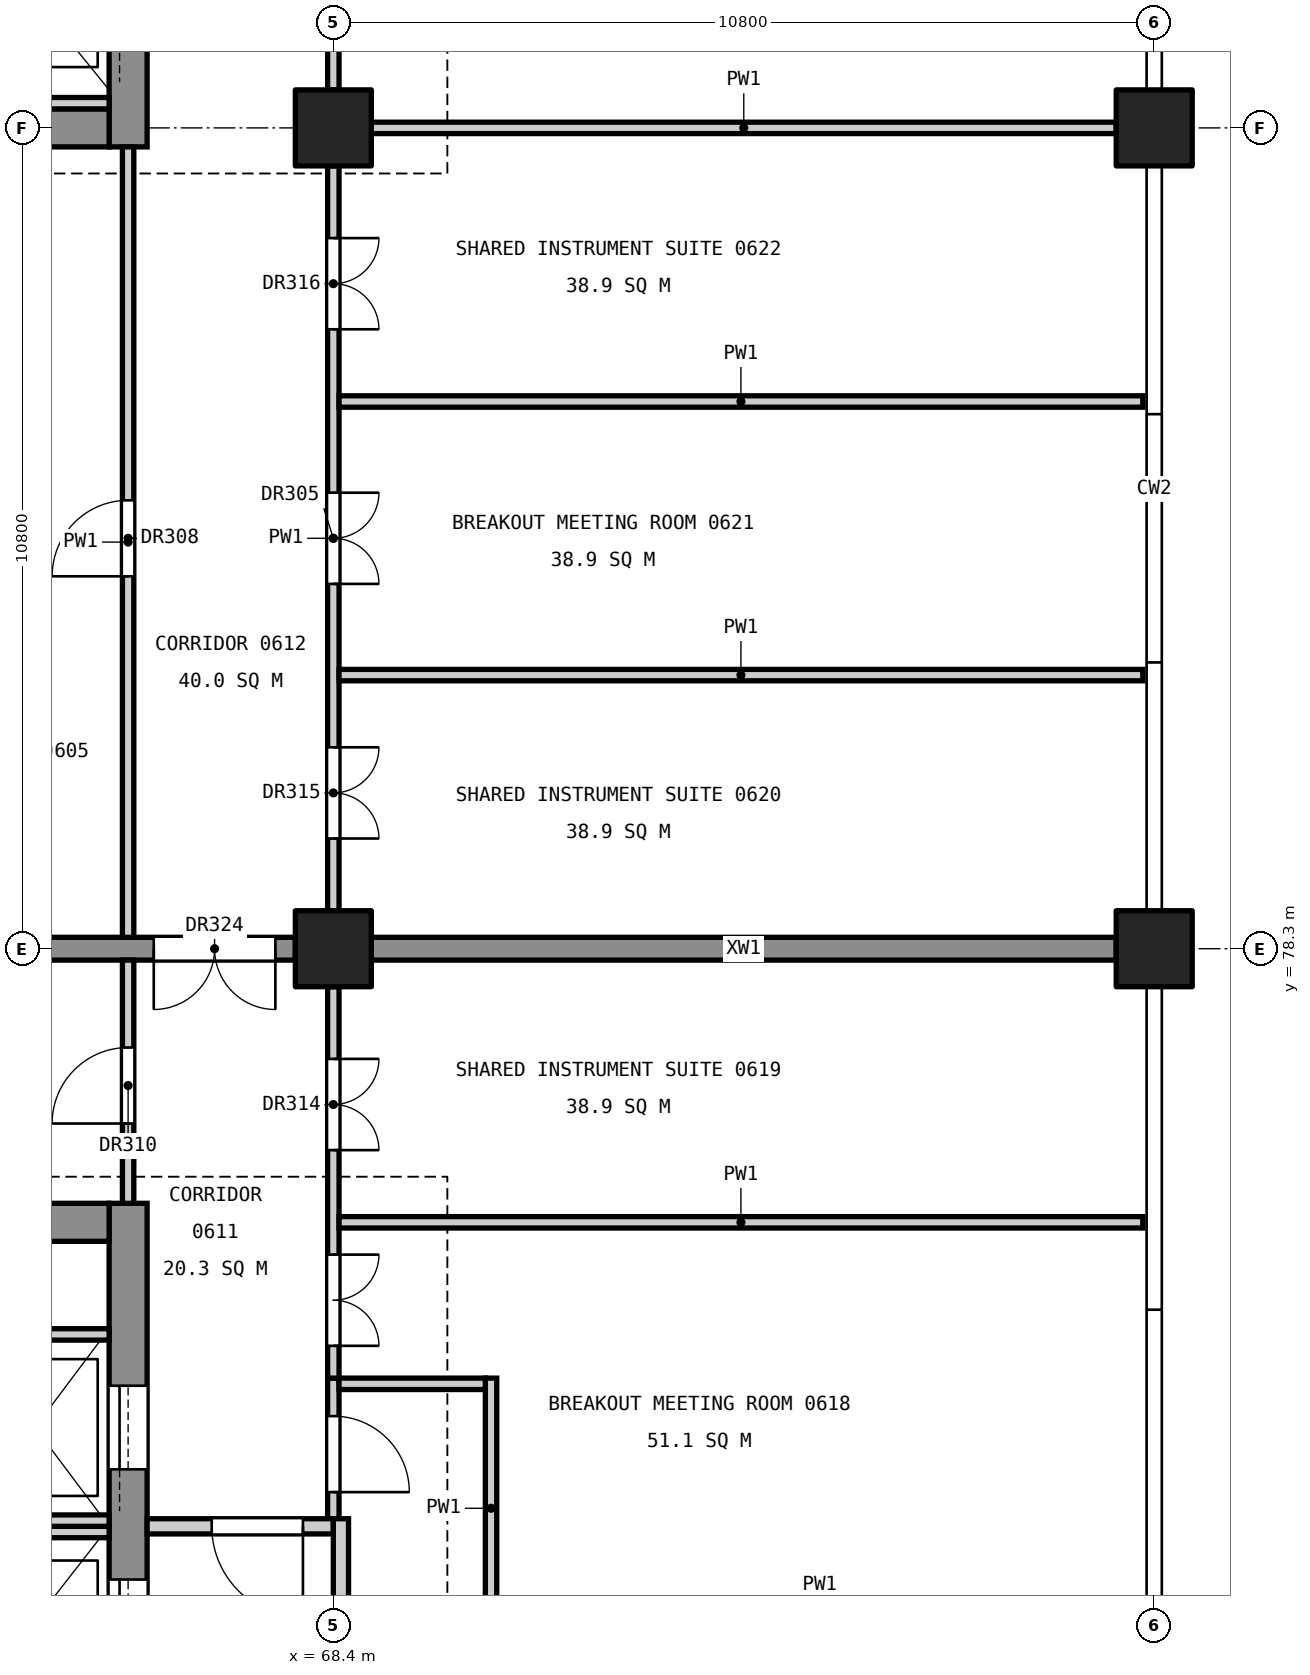
"""IFC4 building model, lengths in metres.
Left out: names, types, materials, properties, quantities, classifications, styles, units other than length and angle.
Written with IfcOpenShell. Run it as: python <this file> out.ifc"""

import sys

from ifc_helpers import new_model, si_unit, direction, frame, frame_2d, origin, origin_2d, place, context, subcontext, project, spatial, rectangle, extrude, element, fill, save


model = new_model("IFC4")
c1 = context("Model", 3, precision=1e-05, world=origin(), true_north=direction((0.0, 1.0)))
c2 = subcontext(c1, "Body", "Model", "MODEL_VIEW")
j1 = project(units=[si_unit("LENGTHUNIT", "METRE"), si_unit("PLANEANGLEUNIT", "RADIAN")], contexts=[c1])
p1 = place(None, origin())
s1 = spatial("IfcSite", under=j1, at=p1, CompositionType="ELEMENT")
p2 = place(p1, origin())
s2 = spatial("IfcBuilding", under=s1, at=p2, CompositionType="ELEMENT")
p3 = place(p2, frame((0.0, 0.0, 31.8)))
s3 = spatial("IfcBuildingStorey", under=s2, at=p3, CompositionType="ELEMENT", Elevation=31.8)
for number, where, z_axis, x_axis in (
    (1, (68.4, 78.3, 0.0), (0.0, 0.0, 1.0), (1.0, 0.0, 0.0)),
    (2, (68.4, 89.1, 0.0), (0.0, 0.0, 1.0), (1.0, 0.0, 0.0)),
    (3, (79.2, 78.3, 0.0), (0.0, 0.0, 1.0), (1.0, 0.0, 0.0)),
    (4, (79.2, 89.1, 0.0), (0.0, 0.0, 1.0), (1.0, 0.0, 0.0)),
):
    element("IfcColumn", number, at=place(p3, frame(where, z_axis=z_axis, x_axis=x_axis)), inside=s3, PredefinedType="COLUMN", context=c2, shape_type="SweptSolid", body=[
        extrude(rectangle(XDim=1.0, YDim=1.0, at=origin_2d()), origin(), (0.0, 0.0, 1.0), 4.8),
    ])
p4 = place(p3, frame((65.7, 60.05, 0.0), z_axis=(0.0, 0.0, 1.0), x_axis=(0.0, 1.0, 0.0)))
e5 = element("IfcWall", 5, at=p4, inside=s3, PredefinedType="SHEAR", context=c2, shape_type="SweptSolid", body=[
    extrude(rectangle(XDim=14.9, YDim=0.5, at=frame_2d((7.45, 0.0))), origin(), (0.0, 0.0, 1.0), 4.55),
])
p5 = place(p4, frame((0.55, 0.0, 0.0)))
e6 = element("IfcOpeningElement", 6, at=p5, cuts=e5, PredefinedType="OPENING", context=c2, shape_type="SweptSolid", body=[
    extrude(rectangle(XDim=1.4, YDim=2.1, at=frame_2d((0.7, 1.05))), frame((0.0, 0.26, 0.0), z_axis=(0.0, -1.0, 0.0), x_axis=(1.0, 0.0, 0.0)), (0.0, 0.0, 1.0), 0.52),
])
p6 = place(p4, frame((8.85, 0.0, 0.0)))
e7 = element("IfcOpeningElement", 7, at=p6, cuts=e5, PredefinedType="OPENING", context=c2, shape_type="SweptSolid", body=[
    extrude(rectangle(XDim=1.1, YDim=2.1, at=frame_2d((0.55, 1.05))), frame((0.0, 0.26, 0.0), z_axis=(0.0, -1.0, 0.0), x_axis=(1.0, 0.0, 0.0)), (0.0, 0.0, 1.0), 0.52),
])
p7 = place(p4, frame((11.4, 0.0, 0.0)))
e8 = element("IfcOpeningElement", 8, at=p7, cuts=e5, PredefinedType="OPENING", context=c2, shape_type="SweptSolid", body=[
    extrude(rectangle(XDim=1.1, YDim=2.1, at=frame_2d((0.55, 1.05))), frame((0.0, 0.26, 0.0), z_axis=(0.0, -1.0, 0.0), x_axis=(1.0, 0.0, 0.0)), (0.0, 0.0, 1.0), 0.52),
])
p8 = place(p3, frame((61.45, 74.7, 0.0), z_axis=(0.0, 0.0, 1.0), x_axis=(1.0, 0.0, 0.0)))
e9 = element("IfcWall", 9, at=p8, inside=s3, PredefinedType="SHEAR", context=c2, shape_type="SweptSolid", body=[
    extrude(rectangle(XDim=4.0, YDim=0.5, at=frame_2d((2.0, 0.0))), origin(), (0.0, 0.0, 1.0), 4.55),
])
p9 = place(p3, frame((65.7, 88.85, 0.0), z_axis=(0.0, 0.0, 1.0), x_axis=(0.0, 1.0, 0.0)))
e10 = element("IfcWall", 10, at=p9, inside=s3, PredefinedType="SHEAR", context=c2, shape_type="SweptSolid", body=[
    extrude(rectangle(XDim=11.3, YDim=0.5, at=frame_2d((5.65, 0.0))), origin(), (0.0, 0.0, 1.0), 4.55),
])
p10 = place(p9, frame((9.35, 0.0, 0.0)))
e11 = element("IfcOpeningElement", 11, at=p10, cuts=e10, PredefinedType="OPENING", context=c2, shape_type="SweptSolid", body=[
    extrude(rectangle(XDim=1.4, YDim=2.1, at=frame_2d((0.7, 1.05))), frame((0.0, 0.26, 0.0), z_axis=(0.0, -1.0, 0.0), x_axis=(1.0, 0.0, 0.0)), (0.0, 0.0, 1.0), 0.52),
])
p11 = place(p9, frame((1.4, 0.0, 0.0)))
e12 = element("IfcOpeningElement", 12, at=p11, cuts=e10, PredefinedType="OPENING", context=c2, shape_type="SweptSolid", body=[
    extrude(rectangle(XDim=1.1, YDim=2.1, at=frame_2d((0.55, 1.05))), frame((0.0, 0.26, 0.0), z_axis=(0.0, -1.0, 0.0), x_axis=(1.0, 0.0, 0.0)), (0.0, 0.0, 1.0), 0.52),
])
p12 = place(p3, frame((61.45, 89.1, 0.0), z_axis=(0.0, 0.0, 1.0), x_axis=(1.0, 0.0, 0.0)))
e13 = element("IfcWall", 13, at=p12, inside=s3, PredefinedType="SHEAR", context=c2, shape_type="SweptSolid", body=[
    extrude(rectangle(XDim=4.0, YDim=0.5, at=frame_2d((2.0, 0.0))), origin(), (0.0, 0.0, 1.0), 4.55),
])
p13 = place(p3, frame((61.7, 78.3, 0.0), z_axis=(0.0, 0.0, 1.0), x_axis=(1.0, 0.0, 0.0)))
e14 = element("IfcWall", 14, at=p13, inside=s3, PredefinedType="SHEAR", context=c2, shape_type="SweptSolid", body=[
    extrude(rectangle(XDim=6.2, YDim=0.3, at=frame_2d((3.1, 0.0))), origin(), (0.0, 0.0, 1.0), 4.55),
])
p14 = place(p13, frame((4.337, 0.0, 0.0)))
e15 = element("IfcOpeningElement", 15, at=p14, cuts=e14, PredefinedType="OPENING", context=c2, shape_type="SweptSolid", body=[
    extrude(rectangle(XDim=1.6, YDim=2.1, at=frame_2d((0.8, 1.05))), frame((0.0, 0.16, 0.0), z_axis=(0.0, -1.0, 0.0), x_axis=(1.0, 0.0, 0.0)), (0.0, 0.0, 1.0), 0.32),
])
p15 = place(p3, frame((68.9, 78.3, 0.0), z_axis=(0.0, 0.0, 1.0), x_axis=(1.0, 0.0, 0.0)))
e16 = element("IfcWall", 16, at=p15, inside=s3, PredefinedType="SHEAR", context=c2, shape_type="SweptSolid", body=[
    extrude(rectangle(XDim=9.8, YDim=0.3, at=frame_2d((4.9, 0.0))), origin(), (0.0, 0.0, 1.0), 4.55),
])
for number, where, z_axis, x_axis in (
    (17, (63.65, 70.625, 0.0), (0.0, 0.0, 1.0), (1.0, 0.0, 0.0)),
    (18, (63.65, 70.775, 0.0), (0.0, 0.0, 1.0), (1.0, 0.0, 0.0)),
    (19, (63.65, 73.225, 0.0), (0.0, 0.0, 1.0), (1.0, 0.0, 0.0)),
    (20, (63.65, 89.425, 0.0), (0.0, 0.0, 1.0), (1.0, 0.0, 0.0)),
):
    element("IfcWall", number, at=place(p3, frame(where, z_axis=z_axis, x_axis=x_axis)), inside=s3, PredefinedType="SOLIDWALL", context=c2, shape_type="SweptSolid", body=[
        extrude(rectangle(XDim=1.8, YDim=0.15, at=frame_2d((0.9, 0.0))), origin(), (0.0, 0.0, 1.0), 4.8),
    ])
p16 = place(p3, frame((65.7, 74.95, 0.0), z_axis=(0.0, 0.0, 1.0), x_axis=(0.0, 1.0, 0.0)))
e21 = element("IfcWall", 21, at=p16, inside=s3, PredefinedType="PARTITIONING", context=c2, shape_type="SweptSolid", body=[
    extrude(rectangle(XDim=3.2, YDim=0.15, at=frame_2d((1.6, 0.0))), origin(), (0.0, 0.0, 1.0), 3.55),
])
p17 = place(p16, frame((1.05, 0.0, 0.0)))
e22 = element("IfcOpeningElement", 22, at=p17, cuts=e21, PredefinedType="OPENING", context=c2, shape_type="SweptSolid", body=[
    extrude(rectangle(XDim=1.0, YDim=2.1, at=frame_2d((0.5, 1.05))), frame((0.0, 0.085, 0.0), z_axis=(0.0, -1.0, 0.0), x_axis=(1.0, 0.0, 0.0)), (0.0, 0.0, 1.0), 0.17),
])
p18 = place(p3, frame((65.7, 78.45, 0.0), z_axis=(0.0, 0.0, 1.0), x_axis=(0.0, 1.0, 0.0)))
e23 = element("IfcWall", 23, at=p18, inside=s3, PredefinedType="PARTITIONING", context=c2, shape_type="SweptSolid", body=[
    extrude(rectangle(XDim=10.4, YDim=0.15, at=frame_2d((5.2, 0.0))), origin(), (0.0, 0.0, 1.0), 3.55),
])
p19 = place(p18, frame((4.75, 0.0, 0.0)))
e24 = element("IfcOpeningElement", 24, at=p19, cuts=e23, PredefinedType="OPENING", context=c2, shape_type="SweptSolid", body=[
    extrude(rectangle(XDim=1.0, YDim=2.1, at=frame_2d((0.5, 1.05))), frame((0.0, 0.085, 0.0), z_axis=(0.0, -1.0, 0.0), x_axis=(1.0, 0.0, 0.0)), (0.0, 0.0, 1.0), 0.17),
])
p20 = place(p3, frame((68.4, 70.8, 0.0), z_axis=(0.0, 0.0, 1.0), x_axis=(0.0, 1.0, 0.0)))
e25 = element("IfcWall", 25, at=p20, inside=s3, PredefinedType="PARTITIONING", context=c2, shape_type="SweptSolid", body=[
    extrude(rectangle(XDim=1.85, YDim=0.15, at=frame_2d((0.925, 0.0))), origin(), (0.0, 0.0, 1.0), 3.55),
])
p21 = place(p20, frame((0.35, 0.0, 0.0)))
e26 = element("IfcOpeningElement", 26, at=p21, cuts=e25, PredefinedType="OPENING", context=c2, shape_type="SweptSolid", body=[
    extrude(rectangle(XDim=1.0, YDim=2.1, at=frame_2d((0.5, 1.05))), frame((0.0, 0.085, 0.0), z_axis=(0.0, -1.0, 0.0), x_axis=(1.0, 0.0, 0.0)), (0.0, 0.0, 1.0), 0.17),
])
p22 = place(p3, frame((68.4, 78.8, 0.0), z_axis=(0.0, 0.0, 1.0), x_axis=(0.0, 1.0, 0.0)))
e27 = element("IfcWall", 27, at=p22, inside=s3, PredefinedType="PARTITIONING", context=c2, shape_type="SweptSolid", body=[
    extrude(rectangle(XDim=9.8, YDim=0.15, at=frame_2d((4.9, 0.0))), origin(), (0.0, 0.0, 1.0), 3.55),
])
p23 = place(p22, frame((4.3, 0.0, 0.0)))
e28 = element("IfcOpeningElement", 28, at=p23, cuts=e27, PredefinedType="OPENING", context=c2, shape_type="SweptSolid", body=[
    extrude(rectangle(XDim=1.2, YDim=2.1, at=frame_2d((0.6, 1.05))), frame((0.0, 0.085, 0.0), z_axis=(0.0, -1.0, 0.0), x_axis=(1.0, 0.0, 0.0)), (0.0, 0.0, 1.0), 0.17),
])
p24 = place(p22, frame((0.95, 0.0, 0.0)))
e29 = element("IfcOpeningElement", 29, at=p24, cuts=e27, PredefinedType="OPENING", context=c2, shape_type="SweptSolid", body=[
    extrude(rectangle(XDim=1.2, YDim=2.1, at=frame_2d((0.6, 1.05))), frame((0.0, 0.085, 0.0), z_axis=(0.0, -1.0, 0.0), x_axis=(1.0, 0.0, 0.0)), (0.0, 0.0, 1.0), 0.17),
])
p25 = place(p22, frame((7.65, 0.0, 0.0)))
e30 = element("IfcOpeningElement", 30, at=p25, cuts=e27, PredefinedType="OPENING", context=c2, shape_type="SweptSolid", body=[
    extrude(rectangle(XDim=1.2, YDim=2.1, at=frame_2d((0.6, 1.05))), frame((0.0, 0.085, 0.0), z_axis=(0.0, -1.0, 0.0), x_axis=(1.0, 0.0, 0.0)), (0.0, 0.0, 1.0), 0.17),
])
p26 = place(p3, frame((68.4, 89.6, 0.0), z_axis=(0.0, 0.0, 1.0), x_axis=(0.0, 1.0, 0.0)))
e31 = element("IfcWall", 31, at=p26, inside=s3, PredefinedType="PARTITIONING", context=c2, shape_type="SweptSolid", body=[
    extrude(rectangle(XDim=3.5, YDim=0.15, at=frame_2d((1.75, 0.0))), origin(), (0.0, 0.0, 1.0), 3.55),
])
p27 = place(p26, frame((1.15, 0.0, 0.0)))
e32 = element("IfcOpeningElement", 32, at=p27, cuts=e31, PredefinedType="OPENING", context=c2, shape_type="SweptSolid", body=[
    extrude(rectangle(XDim=1.2, YDim=2.1, at=frame_2d((0.6, 1.05))), frame((0.0, 0.085, 0.0), z_axis=(0.0, -1.0, 0.0), x_axis=(1.0, 0.0, 0.0)), (0.0, 0.0, 1.0), 0.17),
])
p28 = place(p3, frame((65.95, 70.7, 0.0), z_axis=(0.0, 0.0, 1.0), x_axis=(1.0, 0.0, 0.0)))
e33 = element("IfcWall", 33, at=p28, inside=s3, PredefinedType="PARTITIONING", context=c2, shape_type="SweptSolid", body=[
    extrude(rectangle(XDim=2.45, YDim=0.2, at=frame_2d((1.225, 0.0))), origin(), (0.0, 0.0, 1.0), 3.55),
])
p29 = place(p28, frame((0.85, 0.0, 0.0)))
e34 = element("IfcOpeningElement", 34, at=p29, cuts=e33, PredefinedType="OPENING", context=c2, shape_type="SweptSolid", body=[
    extrude(rectangle(XDim=1.2, YDim=2.1, at=frame_2d((0.6, 1.05))), frame((0.0, 0.11, 0.0), z_axis=(0.0, -1.0, 0.0), x_axis=(1.0, 0.0, 0.0)), (0.0, 0.0, 1.0), 0.22),
])
p30 = place(p3, frame((68.5, 68.0, 0.0), z_axis=(0.0, 0.0, 1.0), x_axis=(0.0, 1.0, 0.0)))
e35 = element("IfcWall", 35, at=p30, inside=s3, PredefinedType="PARTITIONING", context=c2, shape_type="SweptSolid", body=[
    extrude(rectangle(XDim=2.8, YDim=0.2, at=frame_2d((1.4, 0.0))), origin(), (0.0, 0.0, 1.0), 3.55),
])
p31 = place(p3, frame((68.4, 72.65, 0.0), z_axis=(0.0, 0.0, 1.0), x_axis=(0.0, 1.0, 0.0)))
e36 = element("IfcWall", 36, at=p31, inside=s3, PredefinedType="PARTITIONING", context=c2, shape_type="SweptSolid", body=[
    extrude(rectangle(XDim=5.15, YDim=0.15, at=frame_2d((2.575, 0.0))), origin(), (0.0, 0.0, 1.0), 3.55),
])
p32 = place(p31, frame((0.425, 0.0, 0.0)))
e37 = element("IfcOpeningElement", 37, at=p32, cuts=e36, PredefinedType="OPENING", context=c2, shape_type="SweptSolid", body=[
    extrude(rectangle(XDim=1.2, YDim=2.1, at=frame_2d((0.6, 1.05))), frame((0.0, 0.085, 0.0), z_axis=(0.0, -1.0, 0.0), x_axis=(1.0, 0.0, 0.0)), (0.0, 0.0, 1.0), 0.17),
])
p33 = place(p31, frame((3.0, 0.0, 0.0)))
e38 = element("IfcOpeningElement", 38, at=p33, cuts=e36, PredefinedType="OPENING", context=c2, shape_type="SweptSolid", body=[
    extrude(rectangle(XDim=1.2, YDim=2.1, at=frame_2d((0.6, 1.05))), frame((0.0, 0.085, 0.0), z_axis=(0.0, -1.0, 0.0), x_axis=(1.0, 0.0, 0.0)), (0.0, 0.0, 1.0), 0.17),
])
p34 = place(p3, frame((70.475, 69.225, 0.0), z_axis=(0.0, 0.0, 1.0), x_axis=(0.0, 1.0, 0.0)))
e39 = element("IfcWall", 39, at=p34, inside=s3, PredefinedType="PARTITIONING", context=c2, shape_type="SweptSolid", body=[
    extrude(rectangle(XDim=3.425, YDim=0.15, at=frame_2d((1.712, 0.0))), origin(), (0.0, 0.0, 1.0), 3.55),
])
p35 = place(p3, frame((68.475, 72.575, 0.0), z_axis=(0.0, 0.0, 1.0), x_axis=(1.0, 0.0, 0.0)))
e40 = element("IfcWall", 40, at=p35, inside=s3, PredefinedType="PARTITIONING", context=c2, shape_type="SweptSolid", body=[
    extrude(rectangle(XDim=1.925, YDim=0.15, at=frame_2d((0.962, 0.0))), origin(), (0.0, 0.0, 1.0), 3.55),
])
for number, where, z_axis, x_axis in (
    (41, (68.475, 74.7, 0.0), (0.0, 0.0, 1.0), (1.0, 0.0, 0.0)),
    (42, (68.475, 81.9, 0.0), (0.0, 0.0, 1.0), (1.0, 0.0, 0.0)),
    (43, (68.475, 85.5, 0.0), (0.0, 0.0, 1.0), (1.0, 0.0, 0.0)),
):
    element("IfcWall", number, at=place(p3, frame(where, z_axis=z_axis, x_axis=x_axis)), inside=s3, PredefinedType="PARTITIONING", context=c2, shape_type="SweptSolid", body=[
        extrude(rectangle(XDim=10.575, YDim=0.15, at=frame_2d((5.288, 0.0))), origin(), (0.0, 0.0, 1.0), 3.85),
    ])
p36 = place(p3, frame((68.9, 89.1, 0.0), z_axis=(0.0, 0.0, 1.0), x_axis=(1.0, 0.0, 0.0)))
e44 = element("IfcWall", 44, at=p36, inside=s3, PredefinedType="PARTITIONING", context=c2, shape_type="SweptSolid", body=[
    extrude(rectangle(XDim=9.8, YDim=0.15, at=frame_2d((4.9, 0.0))), origin(), (0.0, 0.0, 1.0), 3.85),
])
p37 = place(p6, origin())
e45 = element("IfcDoor", 45, at=p37, inside=s3, OperationType="SLIDING_TO_LEFT", PredefinedType="DOOR", context=c2, shape_type="SweptSolid", body=[
    extrude(rectangle(XDim=1.1, YDim=2.1, at=frame_2d((0.55, 1.05))), frame((0.0, 0.025, 0.0), z_axis=(0.0, -1.0, 0.0), x_axis=(1.0, 0.0, 0.0)), (0.0, 0.0, 1.0), 0.05),
])
fill(e7, e45)
p38 = place(p7, origin())
e46 = element("IfcDoor", 46, at=p38, inside=s3, OperationType="SLIDING_TO_LEFT", PredefinedType="DOOR", context=c2, shape_type="SweptSolid", body=[
    extrude(rectangle(XDim=1.1, YDim=2.1, at=frame_2d((0.55, 1.05))), frame((0.0, 0.025, 0.0), z_axis=(0.0, -1.0, 0.0), x_axis=(1.0, 0.0, 0.0)), (0.0, 0.0, 1.0), 0.05),
])
fill(e8, e46)
p39 = place(p32, frame((1.2, 0.0, 0.0), z_axis=(0.0, 0.0, 1.0), x_axis=(-1.0, 0.0, 0.0)))
e47 = element("IfcDoor", 47, at=p39, inside=s3, OperationType="DOUBLE_DOOR_SINGLE_SWING", PredefinedType="DOOR", context=c2, shape_type="SweptSolid", body=[
    extrude(rectangle(XDim=1.2, YDim=2.1, at=frame_2d((0.6, 1.05))), frame((0.0, 0.025, 0.0), z_axis=(0.0, -1.0, 0.0), x_axis=(1.0, 0.0, 0.0)), (0.0, 0.0, 1.0), 0.05),
])
fill(e37, e47)
p40 = place(p23, frame((1.2, 0.0, 0.0), z_axis=(0.0, 0.0, 1.0), x_axis=(-1.0, 0.0, 0.0)))
e48 = element("IfcDoor", 48, at=p40, inside=s3, OperationType="DOUBLE_DOOR_SINGLE_SWING", PredefinedType="DOOR", context=c2, shape_type="SweptSolid", body=[
    extrude(rectangle(XDim=1.2, YDim=2.1, at=frame_2d((0.6, 1.05))), frame((0.0, 0.025, 0.0), z_axis=(0.0, -1.0, 0.0), x_axis=(1.0, 0.0, 0.0)), (0.0, 0.0, 1.0), 0.05),
])
fill(e28, e48)
p41 = place(p19, origin())
e49 = element("IfcDoor", 49, at=p41, inside=s3, OperationType="SINGLE_SWING_LEFT", PredefinedType="DOOR", context=c2, shape_type="SweptSolid", body=[
    extrude(rectangle(XDim=1.0, YDim=2.1, at=frame_2d((0.5, 1.05))), frame((0.0, 0.025, 0.0), z_axis=(0.0, -1.0, 0.0), x_axis=(1.0, 0.0, 0.0)), (0.0, 0.0, 1.0), 0.05),
])
fill(e24, e49)
p42 = place(p17, origin())
e50 = element("IfcDoor", 50, at=p42, inside=s3, OperationType="SINGLE_SWING_LEFT", PredefinedType="DOOR", context=c2, shape_type="SweptSolid", body=[
    extrude(rectangle(XDim=1.0, YDim=2.1, at=frame_2d((0.5, 1.05))), frame((0.0, 0.025, 0.0), z_axis=(0.0, -1.0, 0.0), x_axis=(1.0, 0.0, 0.0)), (0.0, 0.0, 1.0), 0.05),
])
fill(e22, e50)
p43 = place(p33, frame((1.2, 0.0, 0.0), z_axis=(0.0, 0.0, 1.0), x_axis=(-1.0, 0.0, 0.0)))
e51 = element("IfcDoor", 51, at=p43, inside=s3, OperationType="DOUBLE_DOOR_SINGLE_SWING", PredefinedType="DOOR", context=c2, shape_type="SweptSolid", body=[
    extrude(rectangle(XDim=1.2, YDim=2.1, at=frame_2d((0.6, 1.05))), frame((0.0, 0.025, 0.0), z_axis=(0.0, -1.0, 0.0), x_axis=(1.0, 0.0, 0.0)), (0.0, 0.0, 1.0), 0.05),
])
fill(e38, e51)
p44 = place(p24, frame((1.2, 0.0, 0.0), z_axis=(0.0, 0.0, 1.0), x_axis=(-1.0, 0.0, 0.0)))
e52 = element("IfcDoor", 52, at=p44, inside=s3, OperationType="DOUBLE_DOOR_SINGLE_SWING", PredefinedType="DOOR", context=c2, shape_type="SweptSolid", body=[
    extrude(rectangle(XDim=1.2, YDim=2.1, at=frame_2d((0.6, 1.05))), frame((0.0, 0.025, 0.0), z_axis=(0.0, -1.0, 0.0), x_axis=(1.0, 0.0, 0.0)), (0.0, 0.0, 1.0), 0.05),
])
fill(e29, e52)
p45 = place(p25, frame((1.2, 0.0, 0.0), z_axis=(0.0, 0.0, 1.0), x_axis=(-1.0, 0.0, 0.0)))
e53 = element("IfcDoor", 53, at=p45, inside=s3, OperationType="DOUBLE_DOOR_SINGLE_SWING", PredefinedType="DOOR", context=c2, shape_type="SweptSolid", body=[
    extrude(rectangle(XDim=1.2, YDim=2.1, at=frame_2d((0.6, 1.05))), frame((0.0, 0.025, 0.0), z_axis=(0.0, -1.0, 0.0), x_axis=(1.0, 0.0, 0.0)), (0.0, 0.0, 1.0), 0.05),
])
fill(e30, e53)
p46 = place(p21, frame((1.0, 0.0, 0.0), z_axis=(0.0, 0.0, 1.0), x_axis=(-1.0, 0.0, 0.0)))
e54 = element("IfcDoor", 54, at=p46, inside=s3, OperationType="SINGLE_SWING_RIGHT", PredefinedType="DOOR", context=c2, shape_type="SweptSolid", body=[
    extrude(rectangle(XDim=1.0, YDim=2.1, at=frame_2d((0.5, 1.05))), frame((0.0, 0.025, 0.0), z_axis=(0.0, -1.0, 0.0), x_axis=(1.0, 0.0, 0.0)), (0.0, 0.0, 1.0), 0.05),
])
fill(e26, e54)
p47 = place(p29, frame((1.2, 0.0, 0.0), z_axis=(0.0, 0.0, 1.0), x_axis=(-1.0, 0.0, 0.0)))
e55 = element("IfcDoor", 55, at=p47, inside=s3, OperationType="SINGLE_SWING_LEFT", PredefinedType="DOOR", context=c2, shape_type="SweptSolid", body=[
    extrude(rectangle(XDim=1.2, YDim=2.1, at=frame_2d((0.6, 1.05))), frame((0.0, 0.025, 0.0), z_axis=(0.0, -1.0, 0.0), x_axis=(1.0, 0.0, 0.0)), (0.0, 0.0, 1.0), 0.05),
])
fill(e34, e55)
p48 = place(p14, frame((1.6, 0.0, 0.0), z_axis=(0.0, 0.0, 1.0), x_axis=(-1.0, 0.0, 0.0)))
e56 = element("IfcDoor", 56, at=p48, inside=s3, OperationType="DOUBLE_DOOR_SINGLE_SWING", PredefinedType="DOOR", context=c2, shape_type="SweptSolid", body=[
    extrude(rectangle(XDim=1.6, YDim=2.1, at=frame_2d((0.8, 1.05))), frame((0.0, 0.025, 0.0), z_axis=(0.0, -1.0, 0.0), x_axis=(1.0, 0.0, 0.0)), (0.0, 0.0, 1.0), 0.05),
])
fill(e15, e56)
save(model, sys.argv[1])
